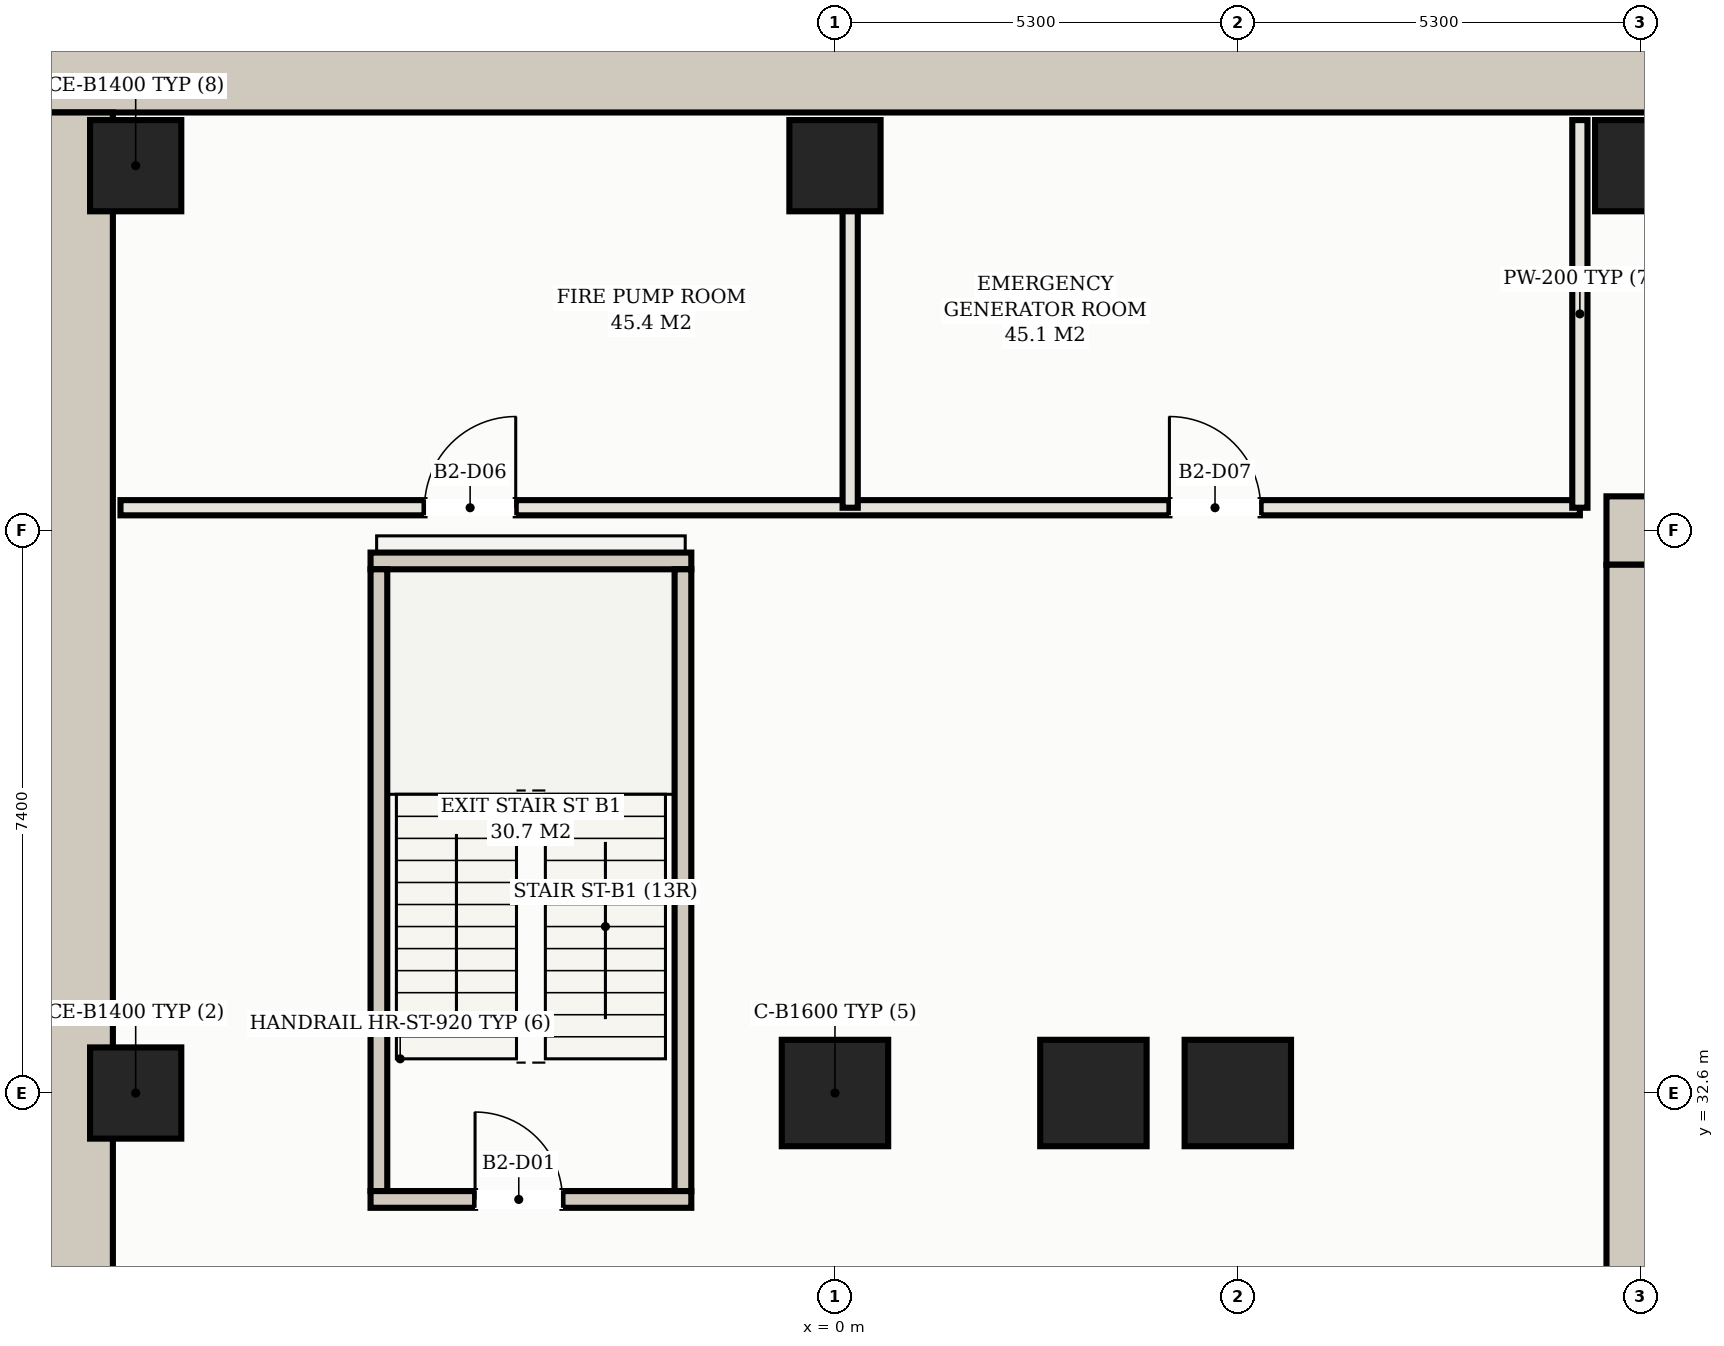
"""IFC4 building model, lengths in metres.
Left out: names, types, materials, properties, quantities, classifications, styles, units other than length and angle.
Written with IfcOpenShell. Run it as: python <this file> out.ifc"""

import sys

from ifc_helpers import new_model, si_unit, direction, frame, frame_2d, origin, origin_2d, place, context, subcontext, project, spatial, rectangle, hollow_rectangle, extrude, element, fill, save


model = new_model("IFC4")
c1 = context("Model", 3, precision=1e-05, world=origin(), true_north=direction((0.0, 1.0)))
c2 = subcontext(c1, "Body", "Model", "MODEL_VIEW")
j1 = project(units=[si_unit("LENGTHUNIT", "METRE"), si_unit("PLANEANGLEUNIT", "RADIAN")], contexts=[c1])
p1 = place(None, origin())
s1 = spatial("IfcSite", under=j1, at=p1, CompositionType="ELEMENT")
p2 = place(p1, origin())
s2 = spatial("IfcBuilding", under=s1, at=p2, CompositionType="ELEMENT")
p3 = place(p2, frame((0.0, 0.0, -8.4)))
s3 = spatial("IfcBuildingStorey", under=s2, at=p3, CompositionType="ELEMENT", Elevation=-8.4)
p4 = place(p3, frame((63.6, 46.05, 0.0), z_axis=(0.0, 0.0, 1.0), x_axis=(-1.0, 0.0, 0.0)))
e1 = element("IfcWall", 1, at=p4, inside=s3, PredefinedType="USERDEFINED", context=c2, shape_type="SweptSolid", body=[
    extrude(rectangle(XDim=74.2, YDim=1.1, at=frame_2d((37.1, 0.0))), origin(), (0.0, 0.0, 1.0), 3.92),
])
p5 = place(p3, frame((-10.05, 45.5, 0.0), z_axis=(0.0, 0.0, 1.0), x_axis=(0.0, -1.0, 0.0)))
e2 = element("IfcWall", 2, at=p5, inside=s3, PredefinedType="USERDEFINED", context=c2, shape_type="SweptSolid", body=[
    extrude(rectangle(XDim=52.8, YDim=1.1, at=frame_2d((26.4, 0.0))), origin(), (0.0, 0.0, 1.0), 3.92),
])
p6 = place(p3, frame((10.15, 40.0, 0.0), z_axis=(0.0, 0.0, 1.0), x_axis=(1.0, 0.0, 0.0)))
e3 = element("IfcWall", 3, at=p6, inside=s3, PredefinedType="SHEAR", context=c2, shape_type="SweptSolid", body=[
    extrude(rectangle(XDim=32.7, YDim=0.9, at=frame_2d((16.35, 0.0))), origin(), (0.0, 0.0, 1.0), 3.92),
])
p7 = place(p3, frame((10.6, 25.65, 0.0), z_axis=(0.0, 0.0, 1.0), x_axis=(0.0, 1.0, 0.0)))
e4 = element("IfcWall", 4, at=p7, inside=s3, PredefinedType="SHEAR", context=c2, shape_type="SweptSolid", body=[
    extrude(rectangle(XDim=13.9, YDim=0.9, at=frame_2d((6.95, 0.0))), origin(), (0.0, 0.0, 1.0), 3.92),
])
for number, where, z_axis, x_axis in (
    (5, (3.4, 32.6, 0.0), (0.0, 0.0, 1.0), (1.0, 0.0, 0.0)),
    (6, (5.3, 32.6, 0.0), (0.0, 0.0, 1.0), (1.0, 0.0, 0.0)),
):
    element("IfcColumn", number, at=place(p3, frame(where, z_axis=z_axis, x_axis=x_axis)), inside=s3, PredefinedType="COLUMN", context=c2, shape_type="SweptSolid", body=[
        extrude(hollow_rectangle(XDim=1.4, YDim=1.4, WallThickness=0.045, at=origin_2d()), origin(), (0.0, 0.0, 1.0), 4.2),
    ])
for number, where, z_axis, x_axis in (
    (7, (-9.2, 32.6, 0.0), (0.0, 0.0, 1.0), (1.0, 0.0, 0.0)),
    (8, (-9.2, 44.8, 0.0), (0.0, 0.0, 1.0), (1.0, 0.0, 0.0)),
):
    element("IfcColumn", number, at=place(p3, frame(where, z_axis=z_axis, x_axis=x_axis)), inside=s3, PredefinedType="COLUMN", context=c2, shape_type="SweptSolid", body=[
        extrude(hollow_rectangle(XDim=1.2, YDim=1.2, WallThickness=0.04, at=origin_2d()), origin(), (0.0, 0.0, 1.0), 4.2),
    ])
p8 = place(p3, frame((0.0, 32.6, 0.0), z_axis=(0.0, 0.0, 1.0), x_axis=(1.0, 0.0, 0.0)))
e9 = element("IfcColumn", 9, at=p8, inside=s3, PredefinedType="COLUMN", context=c2, shape_type="SweptSolid", body=[
    extrude(hollow_rectangle(XDim=1.4, YDim=1.4, WallThickness=0.045, at=origin_2d()), origin(), (0.0, 0.0, 1.0), 4.2),
])
for number, where, z_axis, x_axis in (
    (10, (0.0, 44.8, 0.0), (0.0, 0.0, 1.0), (1.0, 0.0, 0.0)),
    (11, (10.6, 44.8, 0.0), (0.0, 0.0, 1.0), (1.0, 0.0, 0.0)),
):
    element("IfcColumn", number, at=place(p3, frame(where, z_axis=z_axis, x_axis=x_axis)), inside=s3, PredefinedType="COLUMN", context=c2, shape_type="SweptSolid", body=[
        extrude(hollow_rectangle(XDim=1.2, YDim=1.2, WallThickness=0.04, at=origin_2d()), origin(), (0.0, 0.0, 1.0), 4.2),
    ])
p9 = place(p3, frame((-6.11, 39.6, 0.0), z_axis=(0.0, 0.0, 1.0), x_axis=(1.0, 0.0, 0.0)))
e12 = element("IfcWall", 12, at=p9, inside=s3, PredefinedType="SHEAR", context=c2, shape_type="SweptSolid", body=[
    extrude(rectangle(XDim=4.22, YDim=0.22, at=frame_2d((2.11, 0.0))), origin(), (0.0, 0.0, 1.0), 3.92),
])
for number, where, z_axis, x_axis in (
    (13, (-6.0, 31.31, 0.0), (0.0, 0.0, 1.0), (0.0, 1.0, 0.0)),
    (14, (-2.0, 31.31, 0.0), (0.0, 0.0, 1.0), (0.0, 1.0, 0.0)),
):
    element("IfcWall", number, at=place(p3, frame(where, z_axis=z_axis, x_axis=x_axis)), inside=s3, PredefinedType="SHEAR", context=c2, shape_type="SweptSolid", body=[
        extrude(rectangle(XDim=8.18, YDim=0.22, at=frame_2d((4.09, 0.0))), origin(), (0.0, 0.0, 1.0), 3.92),
    ])
p10 = place(p3, frame((-6.11, 31.2, 0.0), z_axis=(0.0, 0.0, 1.0), x_axis=(1.0, 0.0, 0.0)))
e15 = element("IfcWall", 15, at=p10, inside=s3, PredefinedType="SHEAR", context=c2, shape_type="SweptSolid", body=[
    extrude(rectangle(XDim=4.22, YDim=0.22, at=frame_2d((2.11, 0.0))), origin(), (0.0, 0.0, 1.0), 3.92),
])
p11 = place(p10, frame((1.375, 0.0, 0.0)))
e16 = element("IfcOpeningElement", 16, at=p11, cuts=e15, PredefinedType="OPENING", context=c2, shape_type="SweptSolid", body=[
    extrude(rectangle(XDim=1.15, YDim=2.2, at=frame_2d((0.575, 1.1))), frame((0.0, 0.12, 0.0), z_axis=(0.0, -1.0, 0.0), x_axis=(1.0, 0.0, 0.0)), (0.0, 0.0, 1.0), 0.24),
])
p12 = place(p3, frame((-9.4, 40.3, 0.0), z_axis=(0.0, 0.0, 1.0), x_axis=(1.0, 0.0, 0.0)))
e17 = element("IfcWall", 17, at=p12, inside=s3, PredefinedType="PARTITIONING", context=c2, shape_type="SweptSolid", body=[
    extrude(rectangle(XDim=19.2, YDim=0.2, at=frame_2d((9.6, 0.0))), origin(), (0.0, 0.0, 1.0), 3.92),
])
p13 = place(p12, frame((4.0, 0.0, 0.0)))
e18 = element("IfcOpeningElement", 18, at=p13, cuts=e17, PredefinedType="OPENING", context=c2, shape_type="SweptSolid", body=[
    extrude(rectangle(XDim=1.2, YDim=2.2, at=frame_2d((0.6, 1.1))), frame((0.0, 0.11, 0.0), z_axis=(0.0, -1.0, 0.0), x_axis=(1.0, 0.0, 0.0)), (0.0, 0.0, 1.0), 0.22),
])
p14 = place(p12, frame((13.8, 0.0, 0.0)))
e19 = element("IfcOpeningElement", 19, at=p14, cuts=e17, PredefinedType="OPENING", context=c2, shape_type="SweptSolid", body=[
    extrude(rectangle(XDim=1.2, YDim=2.2, at=frame_2d((0.6, 1.1))), frame((0.0, 0.11, 0.0), z_axis=(0.0, -1.0, 0.0), x_axis=(1.0, 0.0, 0.0)), (0.0, 0.0, 1.0), 0.22),
])
p15 = place(p3, frame((9.8, 40.3, 0.0), z_axis=(0.0, 0.0, 1.0), x_axis=(0.0, 1.0, 0.0)))
e20 = element("IfcWall", 20, at=p15, inside=s3, PredefinedType="PARTITIONING", context=c2, shape_type="SweptSolid", body=[
    extrude(rectangle(XDim=5.1, YDim=0.2, at=frame_2d((2.55, 0.0))), origin(), (0.0, 0.0, 1.0), 3.92),
])
p16 = place(p3, frame((0.2, 40.3, 0.0), z_axis=(0.0, 0.0, 1.0), x_axis=(0.0, 1.0, 0.0)))
e21 = element("IfcWall", 21, at=p16, inside=s3, PredefinedType="PARTITIONING", context=c2, shape_type="SweptSolid", body=[
    extrude(rectangle(XDim=5.1, YDim=0.2, at=frame_2d((2.55, 0.0))), origin(), (0.0, 0.0, 1.0), 3.065),
])
p17 = place(p11, origin())
e22 = element("IfcDoor", 22, at=p17, inside=s3, OperationType="SINGLE_SWING_LEFT", PredefinedType="DOOR", context=c2, shape_type="SweptSolid", body=[
    extrude(rectangle(XDim=1.15, YDim=2.2, at=frame_2d((0.575, 1.1))), frame((0.0, 0.025, 0.0), z_axis=(0.0, -1.0, 0.0), x_axis=(1.0, 0.0, 0.0)), (0.0, 0.0, 1.0), 0.05),
])
fill(e16, e22)
p18 = place(p13, origin())
e23 = element("IfcDoor", 23, at=p18, inside=s3, OperationType="SINGLE_SWING_RIGHT", PredefinedType="DOOR", context=c2, shape_type="SweptSolid", body=[
    extrude(rectangle(XDim=1.2, YDim=2.2, at=frame_2d((0.6, 1.1))), frame((0.0, 0.025, 0.0), z_axis=(0.0, -1.0, 0.0), x_axis=(1.0, 0.0, 0.0)), (0.0, 0.0, 1.0), 0.05),
])
fill(e18, e23)
p19 = place(p14, origin())
e24 = element("IfcDoor", 24, at=p19, inside=s3, OperationType="SINGLE_SWING_LEFT", PredefinedType="DOOR", context=c2, shape_type="SweptSolid", body=[
    extrude(rectangle(XDim=1.2, YDim=2.2, at=frame_2d((0.6, 1.1))), frame((0.0, 0.025, 0.0), z_axis=(0.0, -1.0, 0.0), x_axis=(1.0, 0.0, 0.0)), (0.0, 0.0, 1.0), 0.05),
])
fill(e19, e24)
save(model, sys.argv[1])
